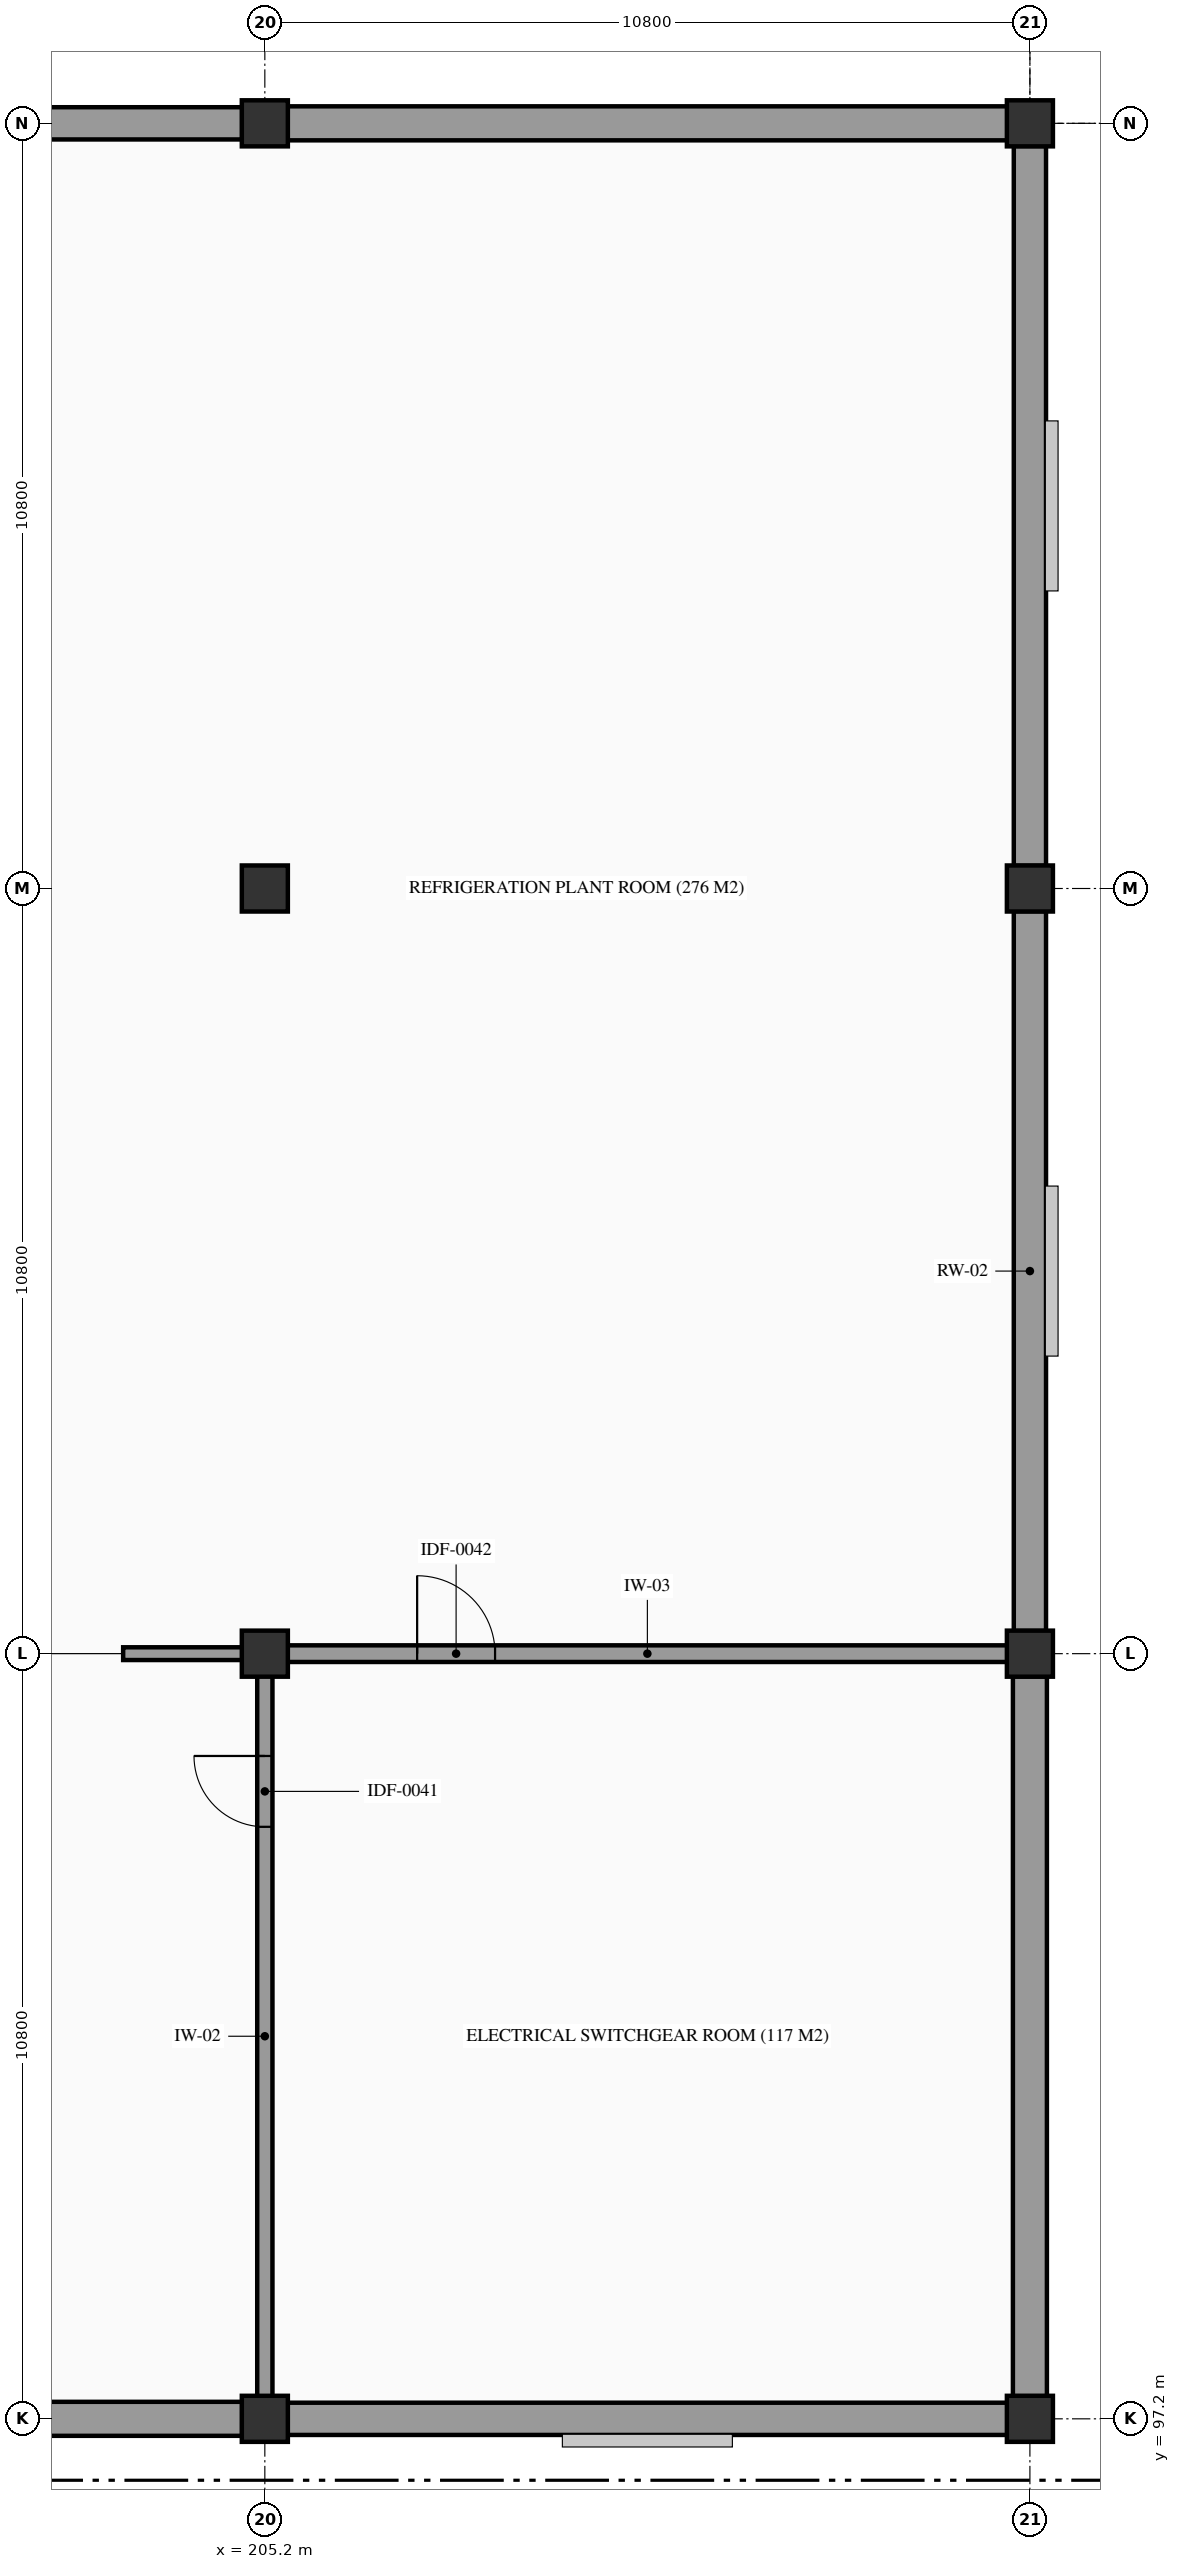
"""IFC4 building model, lengths in metres.
Left out: names, types, materials, properties, quantities, classifications, styles, units other than length and angle.
Written with IfcOpenShell. Run it as: python <this file> out.ifc"""

import sys

from ifc_helpers import new_model, si_unit, direction, frame, frame_2d, origin, origin_2d, place, context, subcontext, project, spatial, rectangle, extrude, element, fill, save


model = new_model("IFC4")
c1 = context("Model", 3, precision=1e-05, world=origin(), true_north=direction((0.0, 1.0)))
c2 = subcontext(c1, "Body", "Model", "MODEL_VIEW")
j1 = project(units=[si_unit("LENGTHUNIT", "METRE"), si_unit("PLANEANGLEUNIT", "RADIAN")], contexts=[c1])
p1 = place(None, origin())
s1 = spatial("IfcSite", under=j1, at=p1, CompositionType="ELEMENT")
p2 = place(p1, origin())
s2 = spatial("IfcBuilding", under=s1, at=p2, CompositionType="ELEMENT")
p3 = place(p2, origin())
s3 = spatial("IfcBuildingStorey", under=s2, at=p3, CompositionType="ELEMENT", Elevation=0.0)
for number, where, z_axis, x_axis in (
    (1, (205.2, 97.2, -1.2), (0.0, 0.0, 1.0), (1.0, 0.0, 0.0)),
    (2, (205.2, 108.0, -1.2), (0.0, 0.0, 1.0), (1.0, 0.0, 0.0)),
    (3, (205.2, 118.8, -1.2), (0.0, 0.0, 1.0), (1.0, 0.0, 0.0)),
    (4, (205.2, 129.6, -1.2), (0.0, 0.0, 1.0), (1.0, 0.0, 0.0)),
    (5, (216.0, 97.2, -1.2), (0.0, 0.0, 1.0), (1.0, 0.0, 0.0)),
    (6, (216.0, 108.0, -1.2), (0.0, 0.0, 1.0), (1.0, 0.0, 0.0)),
    (7, (216.0, 118.8, -1.2), (0.0, 0.0, 1.0), (1.0, 0.0, 0.0)),
    (8, (216.0, 129.6, -1.2), (0.0, 0.0, 1.0), (1.0, 0.0, 0.0)),
):
    element("IfcColumn", number, at=place(p3, frame(where, z_axis=z_axis, x_axis=x_axis)), inside=s3, PredefinedType="COLUMN", context=c2, shape_type="SweptSolid", body=[
        extrude(rectangle(XDim=0.65, YDim=0.65, at=origin_2d()), origin(), (0.0, 0.0, 1.0), 6.6),
    ])
p4 = place(p3, frame((216.0, 97.65, -1.2), z_axis=(0.0, 0.0, 1.0), x_axis=(0.0, 1.0, 0.0)))
e9 = element("IfcWall", 9, at=p4, inside=s3, PredefinedType="USERDEFINED", context=c2, shape_type="SweptSolid", body=[
    extrude(rectangle(XDim=31.5, YDim=0.374, at=frame_2d((15.75, 0.0))), origin(), (0.0, 0.0, 1.0), 0.14),
])
p5 = place(p3, frame((194.72, 97.2, 0.0), z_axis=(0.0, 0.0, 1.0), x_axis=(1.0, 0.0, 0.0)))
e10 = element("IfcWall", 10, at=p5, inside=s3, PredefinedType="STANDARD", context=c2, shape_type="SweptSolid", body=[
    extrude(rectangle(XDim=10.16, YDim=0.48, at=frame_2d((5.08, 0.0))), origin(), (0.0, 0.0, 1.0), 4.25),
])
for number, where, z_axis, x_axis in (
    (11, (194.72, 129.6, 0.0), (0.0, 0.0, 1.0), (1.0, 0.0, 0.0)),
    (12, (205.52, 97.2, 0.0), (0.0, 0.0, 1.0), (1.0, 0.0, 0.0)),
):
    element("IfcWall", number, at=place(p3, frame(where, z_axis=z_axis, x_axis=x_axis)), inside=s3, PredefinedType="STANDARD", context=c2, shape_type="SweptSolid", body=[
        extrude(rectangle(XDim=10.16, YDim=0.455, at=frame_2d((5.08, 0.0))), origin(), (0.0, 0.0, 1.0), 4.25),
    ])
p6 = place(p3, frame((216.0, 97.52, 0.0), z_axis=(0.0, 0.0, 1.0), x_axis=(0.0, 1.0, 0.0)))
e13 = element("IfcWall", 13, at=p6, inside=s3, PredefinedType="STANDARD", context=c2, shape_type="SweptSolid", body=[
    extrude(rectangle(XDim=10.16, YDim=0.48, at=frame_2d((5.08, 0.0))), origin(), (0.0, 0.0, 1.0), 4.25),
])
p7 = place(p3, frame((216.0, 108.32, 0.0), z_axis=(0.0, 0.0, 1.0), x_axis=(0.0, 1.0, 0.0)))
e14 = element("IfcWall", 14, at=p7, inside=s3, PredefinedType="STANDARD", context=c2, shape_type="SweptSolid", body=[
    extrude(rectangle(XDim=10.16, YDim=0.455, at=frame_2d((5.08, 0.0))), origin(), (0.0, 0.0, 1.0), 4.25),
])
p8 = place(p3, frame((205.52, 129.6, 0.0), z_axis=(0.0, 0.0, 1.0), x_axis=(1.0, 0.0, 0.0)))
e15 = element("IfcWall", 15, at=p8, inside=s3, PredefinedType="STANDARD", context=c2, shape_type="SweptSolid", body=[
    extrude(rectangle(XDim=10.16, YDim=0.48, at=frame_2d((5.08, 0.0))), origin(), (0.0, 0.0, 1.0), 4.25),
])
p9 = place(p3, frame((216.0, 119.12, 0.0), z_axis=(0.0, 0.0, 1.0), x_axis=(0.0, 1.0, 0.0)))
e16 = element("IfcWall", 16, at=p9, inside=s3, PredefinedType="STANDARD", context=c2, shape_type="SweptSolid", body=[
    extrude(rectangle(XDim=10.16, YDim=0.455, at=frame_2d((5.08, 0.0))), origin(), (0.0, 0.0, 1.0), 4.25),
])
p10 = place(p3, frame((203.2, 108.0, 0.0), z_axis=(0.0, 0.0, 1.0), x_axis=(1.0, 0.0, 0.0)))
e17 = element("IfcWall", 17, at=p10, inside=s3, PredefinedType="PARTITIONING", context=c2, shape_type="SweptSolid", body=[
    extrude(rectangle(XDim=2.0, YDim=0.18, at=frame_2d((1.0, 0.0))), origin(), (0.0, 0.0, 1.0), 3.95),
])
p11 = place(p3, frame((205.2, 97.2, 0.0), z_axis=(0.0, 0.0, 1.0), x_axis=(0.0, 1.0, 0.0)))
e18 = element("IfcWall", 18, at=p11, inside=s3, PredefinedType="PARTITIONING", context=c2, shape_type="SweptSolid", body=[
    extrude(rectangle(XDim=10.8, YDim=0.215, at=frame_2d((5.4, 0.0))), origin(), (0.0, 0.0, 1.0), 3.95),
])
p12 = place(p11, frame((8.356, 0.0, 0.0)))
e19 = element("IfcOpeningElement", 19, at=p12, cuts=e18, PredefinedType="OPENING", context=c2, shape_type="SweptSolid", body=[
    extrude(rectangle(XDim=1.0, YDim=2.15, at=frame_2d((0.5, 1.075))), frame((0.0, 0.117, 0.0), z_axis=(0.0, -1.0, 0.0), x_axis=(1.0, 0.0, 0.0)), (0.0, 0.0, 1.0), 0.235),
])
p13 = place(p3, frame((205.2, 108.0, 0.0), z_axis=(0.0, 0.0, 1.0), x_axis=(1.0, 0.0, 0.0)))
e20 = element("IfcWall", 20, at=p13, inside=s3, PredefinedType="PARTITIONING", context=c2, shape_type="SweptSolid", body=[
    extrude(rectangle(XDim=10.8, YDim=0.235, at=frame_2d((5.4, 0.0))), origin(), (0.0, 0.0, 1.0), 3.95),
])
p14 = place(p13, frame((2.15, 0.0, 0.0)))
e21 = element("IfcOpeningElement", 21, at=p14, cuts=e20, PredefinedType="OPENING", context=c2, shape_type="SweptSolid", body=[
    extrude(rectangle(XDim=1.1, YDim=2.2, at=frame_2d((0.55, 1.1))), frame((0.0, 0.127, 0.0), z_axis=(0.0, -1.0, 0.0), x_axis=(1.0, 0.0, 0.0)), (0.0, 0.0, 1.0), 0.255),
])
p15 = place(p12, origin())
e22 = element("IfcDoor", 22, at=p15, inside=s3, OperationType="SINGLE_SWING_RIGHT", PredefinedType="DOOR", context=c2, shape_type="SweptSolid", body=[
    extrude(rectangle(XDim=1.0, YDim=2.15, at=frame_2d((0.5, 1.075))), frame((0.0, 0.025, 0.0), z_axis=(0.0, -1.0, 0.0), x_axis=(1.0, 0.0, 0.0)), (0.0, 0.0, 1.0), 0.05),
])
fill(e19, e22)
p16 = place(p14, frame((1.1, 0.0, 0.0), z_axis=(0.0, 0.0, 1.0), x_axis=(-1.0, 0.0, 0.0)))
e23 = element("IfcDoor", 23, at=p16, inside=s3, OperationType="SINGLE_SWING_LEFT", PredefinedType="DOOR", context=c2, shape_type="SweptSolid", body=[
    extrude(rectangle(XDim=1.1, YDim=2.2, at=frame_2d((0.55, 1.1))), frame((0.0, 0.025, 0.0), z_axis=(0.0, -1.0, 0.0), x_axis=(1.0, 0.0, 0.0)), (0.0, 0.0, 1.0), 0.05),
])
fill(e21, e23)
save(model, sys.argv[1])
